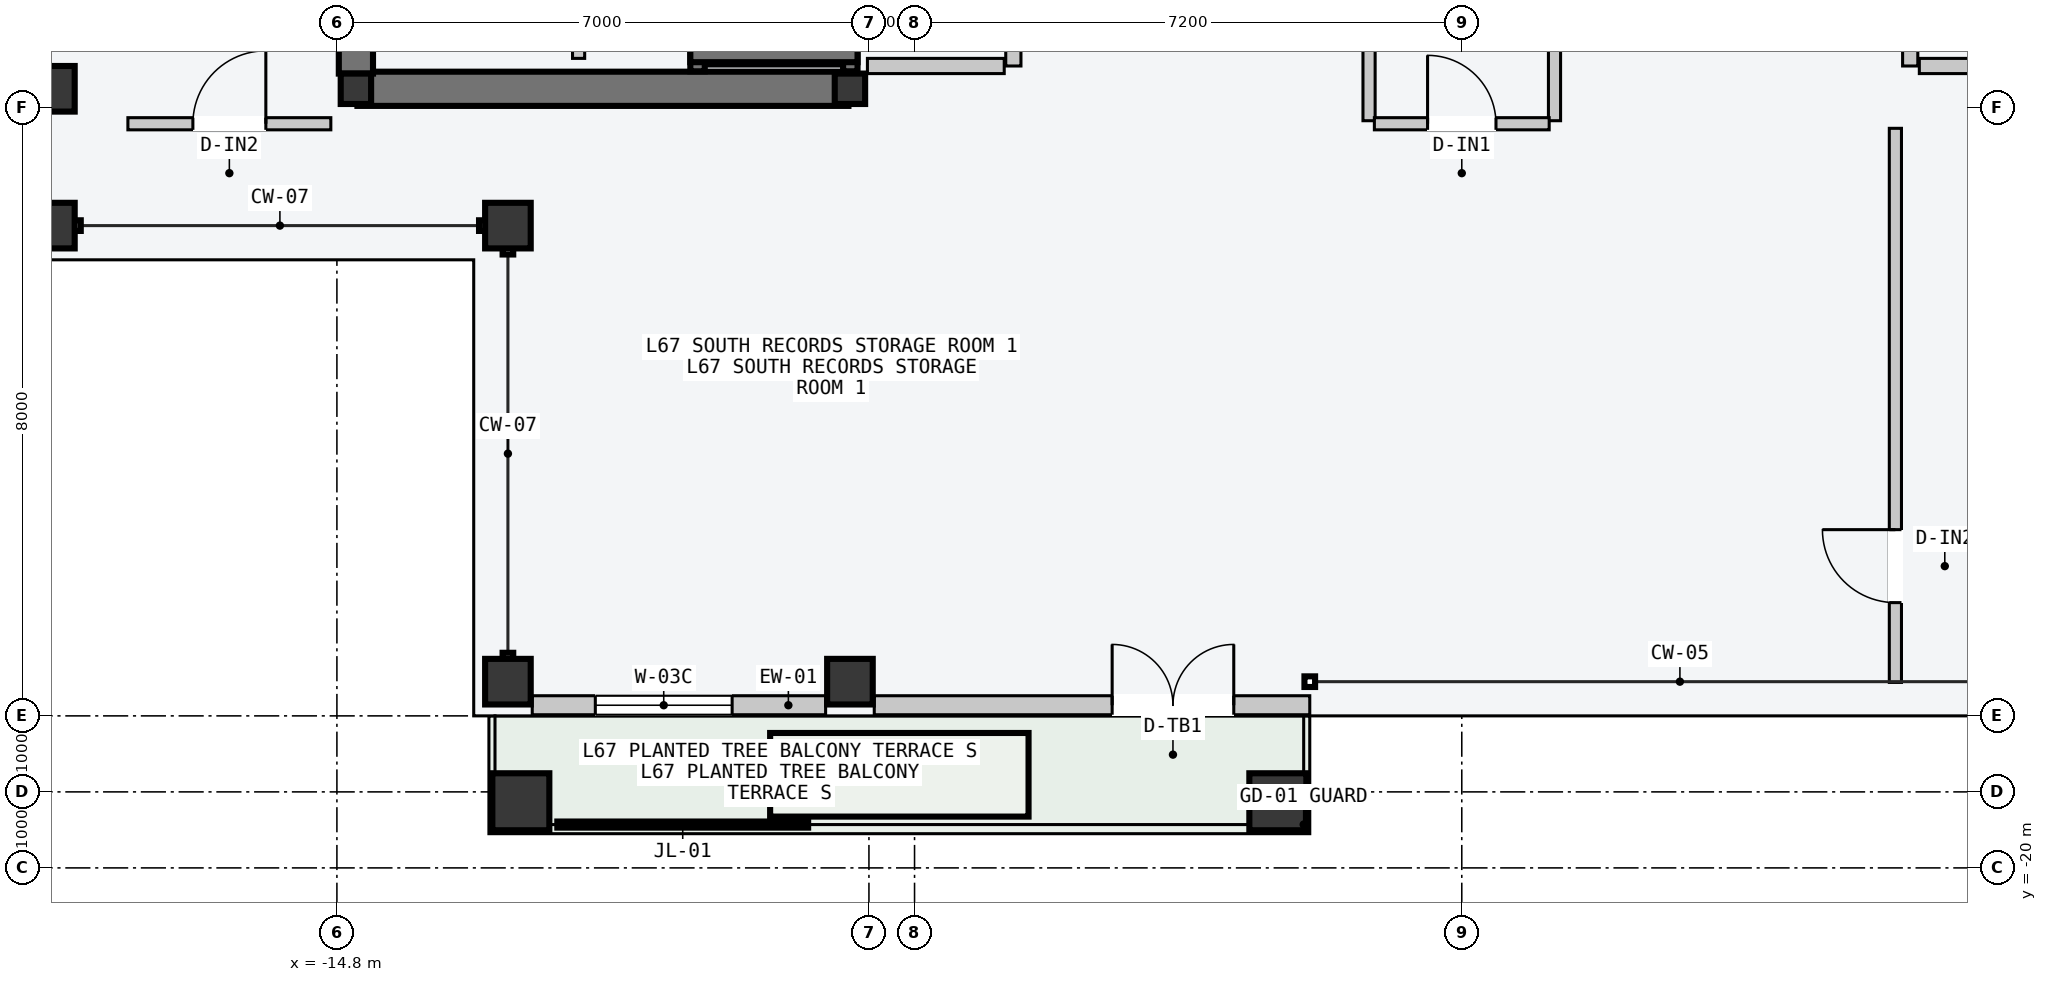
"""IFC4 building model, lengths in metres.
Left out: names, types, materials, properties, quantities, classifications, styles, units other than length and angle.
Written with IfcOpenShell. Run it as: python <this file> out.ifc"""

import sys

from ifc_helpers import new_model, si_unit, direction, frame, frame_2d, origin, origin_2d, place, context, subcontext, project, spatial, rectangle, hollow_rectangle, i_section, extrude, element, fill, save


model = new_model("IFC4")
c1 = context("Model", 3, precision=1e-05, world=origin(), true_north=direction((0.0, 1.0)))
c2 = subcontext(c1, "Body", "Model", "MODEL_VIEW")
j1 = project(units=[si_unit("LENGTHUNIT", "METRE"), si_unit("PLANEANGLEUNIT", "RADIAN")], contexts=[c1])
p1 = place(None, origin())
s1 = spatial("IfcSite", under=j1, at=p1, CompositionType="ELEMENT")
p2 = place(p1, origin())
s2 = spatial("IfcBuilding", under=s1, at=p2, CompositionType="ELEMENT")
p3 = place(p2, frame((0.0, 0.0, 254.4)))
s3 = spatial("IfcBuildingStorey", under=s2, at=p3, CompositionType="ELEMENT", Elevation=254.4)
p4 = place(p3, frame((-14.53, -9.75, -0.2), z_axis=(0.0, 0.0, 1.0), x_axis=(1.0, 0.0, 0.0)))
e1 = element("IfcWall", 1, at=p4, inside=s3, PredefinedType="SHEAR", context=c2, shape_type="SweptSolid", body=[
    extrude(rectangle(XDim=6.46, YDim=0.45, at=frame_2d((3.23, 0.0))), origin(), (0.0, 0.0, 1.0), 3.6),
])
p5 = place(p3, frame((-14.55, -9.55, -0.2), z_axis=(0.0, 0.0, 1.0), x_axis=(0.0, 1.0, 0.0)))
e2 = element("IfcWall", 2, at=p5, inside=s3, PredefinedType="SHEAR", context=c2, shape_type="SweptSolid", body=[
    extrude(rectangle(XDim=9.35, YDim=0.45, at=frame_2d((4.675, 0.0))), origin(), (0.0, 0.0, 1.0), 3.6),
])
for number, where, z_axis, x_axis in (
    (3, (-14.55, -9.75, 0.0), (0.0, 0.0, 1.0), (1.0, 0.0, 0.0)),
    (4, (-8.05, -9.75, 0.0), (0.0, 0.0, 1.0), (1.0, 0.0, 0.0)),
):
    element("IfcColumn", number, at=place(p3, frame(where, z_axis=z_axis, x_axis=x_axis)), inside=s3, PredefinedType="COLUMN", context=c2, shape_type="SweptSolid", body=[
        extrude(i_section(OverallWidth=0.4, OverallDepth=0.4, WebThickness=0.013, FlangeThickness=0.021, at=origin_2d()), origin(), (0.0, 0.0, 1.0), 3.6),
    ])
for number, where, z_axis, x_axis in (
    (5, (-12.55, -17.55, 0.0), (0.0, 0.0, 1.0), (1.0, 0.0, 0.0)),
    (6, (-8.05, -17.55, 0.0), (0.0, 0.0, 1.0), (1.0, 0.0, 0.0)),
    (7, (-18.55, -11.55, 0.0), (0.0, 0.0, 1.0), (0.0, 1.0, 0.0)),
    (8, (-18.55, -9.75, 0.0), (0.0, 0.0, 1.0), (0.0, 1.0, 0.0)),
    (9, (-12.55, -11.55, 0.0), (0.0, 0.0, 1.0), (1.0, 0.0, 0.0)),
):
    element("IfcColumn", number, at=place(p3, frame(where, z_axis=z_axis, x_axis=x_axis)), inside=s3, PredefinedType="COLUMN", context=c2, shape_type="SweptSolid", body=[
        extrude(hollow_rectangle(XDim=0.6, YDim=0.6, WallThickness=0.025, at=origin_2d()), origin(), (0.0, 0.0, 1.0), 3.6),
    ])
for number, where, z_axis, x_axis in (
    (10, (-12.38, -19.13, 0.0), (0.0, 0.0, 1.0), (1.0, 0.0, 0.0)),
    (11, (-2.42, -19.13, 0.0), (0.0, 0.0, 1.0), (1.0, 0.0, 0.0)),
):
    element("IfcColumn", number, at=place(p3, frame(where, z_axis=z_axis, x_axis=x_axis)), inside=s3, PredefinedType="COLUMN", context=c2, shape_type="SweptSolid", body=[
        extrude(hollow_rectangle(XDim=0.75, YDim=0.75, WallThickness=0.032, at=origin_2d()), origin(), (0.0, 0.0, 1.0), 3.6),
    ])
p6 = place(p3, frame((-12.23, -17.86, 0.0), z_axis=(0.0, 0.0, 1.0), x_axis=(1.0, 0.0, 0.0)))
e12 = element("IfcWall", 12, at=p6, inside=s3, PredefinedType="STANDARD", context=c2, shape_type="SweptSolid", body=[
    extrude(rectangle(XDim=3.86, YDim=0.25, at=frame_2d((1.93, 0.0))), origin(), (0.0, 0.0, 1.0), 3.4),
])
p7 = place(p6, frame((0.83, 0.0, 0.85)))
e13 = element("IfcOpeningElement", 13, at=p7, cuts=e12, PredefinedType="OPENING", context=c2, shape_type="SweptSolid", body=[
    extrude(rectangle(XDim=1.8, YDim=2.05, at=frame_2d((0.9, 1.025))), frame((0.0, 0.135, 0.0), z_axis=(0.0, -1.0, 0.0), x_axis=(1.0, 0.0, 0.0)), (0.0, 0.0, 1.0), 0.27),
])
p8 = place(p3, frame((-7.73, -17.86, 0.0), z_axis=(0.0, 0.0, 1.0), x_axis=(1.0, 0.0, 0.0)))
e14 = element("IfcWall", 14, at=p8, inside=s3, PredefinedType="STANDARD", context=c2, shape_type="SweptSolid", body=[
    extrude(rectangle(XDim=5.73, YDim=0.25, at=frame_2d((2.865, 0.0))), origin(), (0.0, 0.0, 1.0), 3.4),
])
p9 = place(p8, frame((3.13, 0.0, 0.0)))
e15 = element("IfcOpeningElement", 15, at=p9, cuts=e14, PredefinedType="OPENING", context=c2, shape_type="SweptSolid", body=[
    extrude(rectangle(XDim=1.6, YDim=2.2, at=frame_2d((0.8, 1.1))), frame((0.0, 0.135, 0.0), z_axis=(0.0, -1.0, 0.0), x_axis=(1.0, 0.0, 0.0)), (0.0, 0.0, 1.0), 0.27),
])
p10 = place(p3, frame((-8.045, -9.52, -0.2), z_axis=(0.0, 0.0, 1.0), x_axis=(0.0, 1.0, 0.0)))
e16 = element("IfcWall", 16, at=p10, inside=s3, PredefinedType="SOLIDWALL", context=c2, shape_type="SweptSolid", body=[
    extrude(rectangle(XDim=2.12, YDim=0.19, at=frame_2d((1.06, 0.0))), origin(), (0.0, 0.0, 1.0), 3.6),
])
p11 = place(p10, frame((0.57, 0.0, 0.2)))
e17 = element("IfcOpeningElement", 17, at=p11, cuts=e16, PredefinedType="OPENING", context=c2, shape_type="SweptSolid", body=[
    extrude(rectangle(XDim=1.1, YDim=2.2, at=frame_2d((0.55, 1.1))), frame((0.0, 0.105, 0.0), z_axis=(0.0, -1.0, 0.0), x_axis=(1.0, 0.0, 0.0)), (0.0, 0.0, 1.0), 0.21),
])
p12 = place(p3, frame((-10.055, -9.52, -0.2), z_axis=(0.0, 0.0, 1.0), x_axis=(0.0, 1.0, 0.0)))
e18 = element("IfcWall", 18, at=p12, inside=s3, PredefinedType="SOLIDWALL", context=c2, shape_type="SweptSolid", body=[
    extrude(rectangle(XDim=2.12, YDim=0.19, at=frame_2d((1.06, 0.0))), origin(), (0.0, 0.0, 1.0), 3.6),
])
p13 = place(p3, frame((-10.15, -9.305, -0.2), z_axis=(0.0, 0.0, 1.0), x_axis=(1.0, 0.0, 0.0)))
e19 = element("IfcWall", 19, at=p13, inside=s3, PredefinedType="SOLIDWALL", context=c2, shape_type="SweptSolid", body=[
    extrude(rectangle(XDim=2.2, YDim=0.19, at=frame_2d((1.1, 0.0))), origin(), (0.0, 0.0, 1.0), 3.6),
])
p14 = place(p3, frame((-5.9, -9.45, 0.0), z_axis=(0.0, 0.0, 1.0), x_axis=(0.0, 1.0, 0.0)))
e20 = element("IfcWall", 20, at=p14, inside=s3, PredefinedType="PARTITIONING", context=c2, shape_type="SweptSolid", body=[
    extrude(rectangle(XDim=10.5, YDim=0.2, at=frame_2d((5.25, 0.0))), origin(), (0.0, 0.0, 1.0), 3.4),
])
p15 = place(p14, frame((3.9, 0.0, 0.0)))
e21 = element("IfcOpeningElement", 21, at=p15, cuts=e20, PredefinedType="OPENING", context=c2, shape_type="SweptSolid", body=[
    extrude(rectangle(XDim=1.5, YDim=2.2, at=frame_2d((0.75, 1.1))), frame((0.0, 0.11, 0.0), z_axis=(0.0, -1.0, 0.0), x_axis=(1.0, 0.0, 0.0)), (0.0, 0.0, 1.0), 0.22),
])
p16 = place(p3, frame((-6.02, -9.45, 0.0), z_axis=(0.0, 0.0, 1.0), x_axis=(-1.0, 0.0, 0.0)))
e22 = element("IfcWall", 22, at=p16, inside=s3, PredefinedType="PARTITIONING", context=c2, shape_type="SweptSolid", body=[
    extrude(rectangle(XDim=1.8, YDim=0.2, at=frame_2d((0.9, 0.0))), origin(), (0.0, 0.0, 1.0), 3.4),
])
p17 = place(p3, frame((-11.62, -9.35, 0.0), z_axis=(0.0, 0.0, 1.0), x_axis=(0.0, 1.0, 0.0)))
e23 = element("IfcWall", 23, at=p17, inside=s3, PredefinedType="PARTITIONING", context=c2, shape_type="SweptSolid", body=[
    extrude(rectangle(XDim=3.85, YDim=0.16, at=frame_2d((1.925, 0.0))), origin(), (0.0, 0.0, 1.0), 3.4),
])
p18 = place(p17, frame((0.512, 0.0, 0.0)))
e24 = element("IfcOpeningElement", 24, at=p18, cuts=e23, PredefinedType="OPENING", context=c2, shape_type="SweptSolid", body=[
    extrude(rectangle(XDim=0.9, YDim=2.15, at=frame_2d((0.45, 1.075))), frame((0.0, 0.09, 0.0), z_axis=(0.0, -1.0, 0.0), x_axis=(1.0, 0.0, 0.0)), (0.0, 0.0, 1.0), 0.18),
])
p19 = place(p17, frame((2.438, 0.0, 0.0)))
e25 = element("IfcOpeningElement", 25, at=p19, cuts=e23, PredefinedType="OPENING", context=c2, shape_type="SweptSolid", body=[
    extrude(rectangle(XDim=0.9, YDim=2.15, at=frame_2d((0.45, 1.075))), frame((0.0, 0.09, 0.0), z_axis=(0.0, -1.0, 0.0), x_axis=(1.0, 0.0, 0.0)), (0.0, 0.0, 1.0), 0.18),
])
p20 = place(p3, frame((5.9, -9.45, 0.0), z_axis=(0.0, 0.0, 1.0), x_axis=(0.0, 1.0, 0.0)))
e26 = element("IfcWall", 26, at=p20, inside=s3, PredefinedType="PARTITIONING", context=c2, shape_type="SweptSolid", body=[
    extrude(rectangle(XDim=10.5, YDim=0.2, at=frame_2d((5.25, 0.0))), origin(), (0.0, 0.0, 1.0), 3.4),
])
p21 = place(p20, frame((3.9, 0.0, 0.0)))
e27 = element("IfcOpeningElement", 27, at=p21, cuts=e26, PredefinedType="OPENING", context=c2, shape_type="SweptSolid", body=[
    extrude(rectangle(XDim=1.5, YDim=2.2, at=frame_2d((0.75, 1.1))), frame((0.0, 0.11, 0.0), z_axis=(0.0, -1.0, 0.0), x_axis=(1.0, 0.0, 0.0)), (0.0, 0.0, 1.0), 0.22),
])
p22 = place(p3, frame((6.02, -9.45, 0.0), z_axis=(0.0, 0.0, 1.0), x_axis=(1.0, 0.0, 0.0)))
e28 = element("IfcWall", 28, at=p22, inside=s3, PredefinedType="PARTITIONING", context=c2, shape_type="SweptSolid", body=[
    extrude(rectangle(XDim=1.8, YDim=0.2, at=frame_2d((0.9, 0.0))), origin(), (0.0, 0.0, 1.0), 3.4),
])
p23 = place(p3, frame((-1.22, -10.17, 0.0), z_axis=(0.0, 0.0, 1.0), x_axis=(0.0, 1.0, 0.0)))
e29 = element("IfcWall", 29, at=p23, inside=s3, PredefinedType="PARTITIONING", context=c2, shape_type="SweptSolid", body=[
    extrude(rectangle(XDim=4.49, YDim=0.16, at=frame_2d((2.245, 0.0))), origin(), (0.0, 0.0, 1.0), 3.4),
])
p24 = place(p23, frame((1.15, 0.0, 0.0)))
e30 = element("IfcOpeningElement", 30, at=p24, cuts=e29, PredefinedType="OPENING", context=c2, shape_type="SweptSolid", body=[
    extrude(rectangle(XDim=0.96, YDim=2.18, at=frame_2d((0.48, 1.09))), frame((0.0, 0.09, 0.0), z_axis=(0.0, -1.0, 0.0), x_axis=(1.0, 0.0, 0.0)), (0.0, 0.0, 1.0), 0.18),
])
p25 = place(p3, frame((1.22, -10.17, 0.0), z_axis=(0.0, 0.0, 1.0), x_axis=(0.0, 1.0, 0.0)))
e31 = element("IfcWall", 31, at=p25, inside=s3, PredefinedType="PARTITIONING", context=c2, shape_type="SweptSolid", body=[
    extrude(rectangle(XDim=4.49, YDim=0.16, at=frame_2d((2.245, 0.0))), origin(), (0.0, 0.0, 1.0), 3.4),
])
p26 = place(p25, frame((1.15, 0.0, 0.0)))
e32 = element("IfcOpeningElement", 32, at=p26, cuts=e31, PredefinedType="OPENING", context=c2, shape_type="SweptSolid", body=[
    extrude(rectangle(XDim=0.96, YDim=2.18, at=frame_2d((0.48, 1.09))), frame((0.0, 0.09, 0.0), z_axis=(0.0, -1.0, 0.0), x_axis=(1.0, 0.0, 0.0)), (0.0, 0.0, 1.0), 0.18),
])
p27 = place(p3, frame((5.705, -17.56, 0.0), z_axis=(0.0, 0.0, 1.0), x_axis=(0.0, 1.0, 0.0)))
e33 = element("IfcWall", 33, at=p27, inside=s3, PredefinedType="PARTITIONING", context=c2, shape_type="SweptSolid", body=[
    extrude(rectangle(XDim=7.29, YDim=0.16, at=frame_2d((3.645, 0.0))), origin(), (0.0, 0.0, 1.0), 3.4),
])
p28 = place(p27, frame((1.05, 0.0, 0.0)))
e34 = element("IfcOpeningElement", 34, at=p28, cuts=e33, PredefinedType="OPENING", context=c2, shape_type="SweptSolid", body=[
    extrude(rectangle(XDim=0.96, YDim=2.18, at=frame_2d((0.48, 1.09))), frame((0.0, 0.09, 0.0), z_axis=(0.0, -1.0, 0.0), x_axis=(1.0, 0.0, 0.0)), (0.0, 0.0, 1.0), 0.18),
])
p29 = place(p3, frame((-1.15, -10.21, 0.0), z_axis=(0.0, 0.0, 1.0), x_axis=(1.0, 0.0, 0.0)))
e35 = element("IfcWall", 35, at=p29, inside=s3, PredefinedType="PARTITIONING", context=c2, shape_type="SweptSolid", body=[
    extrude(rectangle(XDim=2.3, YDim=0.16, at=frame_2d((1.15, 0.0))), origin(), (0.0, 0.0, 1.0), 3.4),
])
p30 = place(p29, frame((0.7, 0.0, 0.0)))
e36 = element("IfcOpeningElement", 36, at=p30, cuts=e35, PredefinedType="OPENING", context=c2, shape_type="SweptSolid", body=[
    extrude(rectangle(XDim=0.9, YDim=2.15, at=frame_2d((0.45, 1.075))), frame((0.0, 0.09, 0.0), z_axis=(0.0, -1.0, 0.0), x_axis=(1.0, 0.0, 0.0)), (0.0, 0.0, 1.0), 0.18),
])
p31 = place(p3, frame((-17.55, -10.21, 0.0), z_axis=(0.0, 0.0, 1.0), x_axis=(1.0, 0.0, 0.0)))
e37 = element("IfcWall", 37, at=p31, inside=s3, PredefinedType="PARTITIONING", context=c2, shape_type="SweptSolid", body=[
    extrude(rectangle(XDim=2.67, YDim=0.16, at=frame_2d((1.335, 0.0))), origin(), (0.0, 0.0, 1.0), 3.4),
])
p32 = place(p31, frame((0.855, 0.0, 0.0)))
e38 = element("IfcOpeningElement", 38, at=p32, cuts=e37, PredefinedType="OPENING", context=c2, shape_type="SweptSolid", body=[
    extrude(rectangle(XDim=0.96, YDim=2.18, at=frame_2d((0.48, 1.09))), frame((0.0, 0.09, 0.0), z_axis=(0.0, -1.0, 0.0), x_axis=(1.0, 0.0, 0.0)), (0.0, 0.0, 1.0), 0.18),
])
p33 = place(p7, origin())
e39 = element("IfcWindow", 39, at=p33, inside=s3, PartitioningType="SINGLE_PANEL", PredefinedType="WINDOW", context=c2, shape_type="SweptSolid", body=[
    extrude(rectangle(XDim=1.8, YDim=2.05, at=frame_2d((0.9, 1.025))), frame((0.0, 0.03, 0.0), z_axis=(0.0, -1.0, 0.0), x_axis=(1.0, 0.0, 0.0)), (0.0, 0.0, 1.0), 0.06),
])
fill(e13, e39)
p34 = place(p9, origin())
e40 = element("IfcDoor", 40, at=p34, inside=s3, OperationType="DOUBLE_DOOR_SINGLE_SWING", PredefinedType="DOOR", context=c2, shape_type="SweptSolid", body=[
    extrude(rectangle(XDim=1.6, YDim=2.2, at=frame_2d((0.8, 1.1))), frame((0.0, 0.025, 0.0), z_axis=(0.0, -1.0, 0.0), x_axis=(1.0, 0.0, 0.0)), (0.0, 0.0, 1.0), 0.05),
])
fill(e15, e40)
p35 = place(p28, origin())
e41 = element("IfcDoor", 41, at=p35, inside=s3, OperationType="SINGLE_SWING_RIGHT", PredefinedType="DOOR", context=c2, shape_type="SweptSolid", body=[
    extrude(rectangle(XDim=0.96, YDim=2.18, at=frame_2d((0.48, 1.09))), frame((0.0, 0.025, 0.0), z_axis=(0.0, -1.0, 0.0), x_axis=(1.0, 0.0, 0.0)), (0.0, 0.0, 1.0), 0.05),
])
fill(e34, e41)
p36 = place(p30, origin())
e42 = element("IfcDoor", 42, at=p36, inside=s3, OperationType="SINGLE_SWING_LEFT", PredefinedType="DOOR", context=c2, shape_type="SweptSolid", body=[
    extrude(rectangle(XDim=0.9, YDim=2.15, at=frame_2d((0.45, 1.075))), frame((0.0, 0.025, 0.0), z_axis=(0.0, -1.0, 0.0), x_axis=(1.0, 0.0, 0.0)), (0.0, 0.0, 1.0), 0.05),
])
fill(e36, e42)
p37 = place(p32, origin())
e43 = element("IfcDoor", 43, at=p37, inside=s3, OperationType="SINGLE_SWING_RIGHT", PredefinedType="DOOR", context=c2, shape_type="SweptSolid", body=[
    extrude(rectangle(XDim=0.96, YDim=2.18, at=frame_2d((0.48, 1.09))), frame((0.0, 0.025, 0.0), z_axis=(0.0, -1.0, 0.0), x_axis=(1.0, 0.0, 0.0)), (0.0, 0.0, 1.0), 0.05),
])
fill(e38, e43)
save(model, sys.argv[1])
